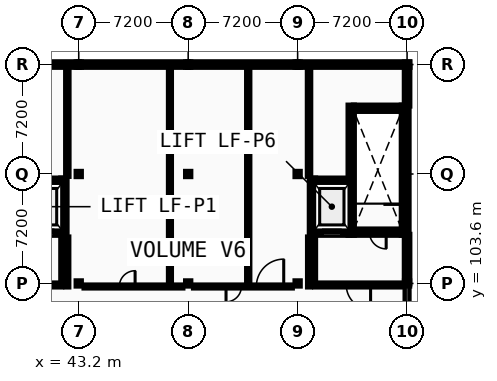
"""IFC4 building model, lengths in metres.
Left out: names, types, materials, properties, quantities, classifications, styles, units other than length and angle.
Written with IfcOpenShell. Run it as: python <this file> out.ifc"""

import sys

from ifc_helpers import new_model, si_unit, direction, frame, frame_2d, origin, origin_2d, place, context, subcontext, project, spatial, rectangle, i_section, extrude, element, fill, save


model = new_model("IFC4")
c1 = context("Model", 3, precision=1e-05, world=origin(), true_north=direction((0.0, 1.0)))
c2 = subcontext(c1, "Body", "Model", "MODEL_VIEW")
j1 = project(units=[si_unit("LENGTHUNIT", "METRE"), si_unit("PLANEANGLEUNIT", "RADIAN")], contexts=[c1])
p1 = place(None, origin())
s1 = spatial("IfcSite", under=j1, at=p1, CompositionType="ELEMENT")
p2 = place(p1, origin())
s2 = spatial("IfcBuilding", under=s1, at=p2, CompositionType="ELEMENT")
p3 = place(p2, frame((0.0, 0.0, 22.8)))
s3 = spatial("IfcBuildingStorey", under=s2, at=p3, CompositionType="ELEMENT", Elevation=22.8)
for number, where, z_axis, x_axis in (
    (1, (43.2, 103.6, 0.0), (0.0, 0.0, 1.0), (1.0, 0.0, 0.0)),
    (2, (43.2, 110.8, 0.0), (0.0, 0.0, 1.0), (1.0, 0.0, 0.0)),
    (3, (43.2, 118.0, 0.0), (0.0, 0.0, 1.0), (1.0, 0.0, 0.0)),
    (4, (50.4, 103.6, 0.0), (0.0, 0.0, 1.0), (1.0, 0.0, 0.0)),
    (5, (50.4, 110.8, 0.0), (0.0, 0.0, 1.0), (1.0, 0.0, 0.0)),
    (6, (50.4, 118.0, 0.0), (0.0, 0.0, 1.0), (1.0, 0.0, 0.0)),
    (7, (57.6, 103.6, 0.0), (0.0, 0.0, 1.0), (1.0, 0.0, 0.0)),
    (8, (57.6, 110.8, 0.0), (0.0, 0.0, 1.0), (1.0, 0.0, 0.0)),
    (9, (57.6, 118.0, 0.0), (0.0, 0.0, 1.0), (1.0, 0.0, 0.0)),
    (10, (64.8, 103.6, 0.0), (0.0, 0.0, 1.0), (1.0, 0.0, 0.0)),
    (11, (64.8, 118.0, 0.0), (0.0, 0.0, 1.0), (1.0, 0.0, 0.0)),
):
    element("IfcColumn", number, at=place(p3, frame(where, z_axis=z_axis, x_axis=x_axis)), inside=s3, PredefinedType="COLUMN", context=c2, shape_type="SweptSolid", body=[
        extrude(i_section(OverallWidth=0.28, OverallDepth=0.28, WebThickness=0.01, FlangeThickness=0.018, FilletRadius=0.024, at=origin_2d()), origin(), (0.0, 0.0, 1.0), 4.4),
    ])
p4 = place(p3, frame((43.2, 118.0, 0.0), z_axis=(0.0, 0.0, 1.0), x_axis=(-1.0, 0.0, 0.0)))
e12 = element("IfcWall", 12, at=p4, inside=s3, PredefinedType="STANDARD", context=c2, shape_type="SweptSolid", body=[
    extrude(rectangle(XDim=7.35, YDim=0.3, at=frame_2d((3.675, 0.0))), origin(), (0.0, 0.0, 1.0), 4.035),
])
p5 = place(p4, frame((1.707, 0.0, 0.95)))
e13 = element("IfcOpeningElement", 13, at=p5, cuts=e12, PredefinedType="OPENING", context=c2, shape_type="SweptSolid", body=[
    extrude(rectangle(XDim=0.996, YDim=1.296, at=frame_2d((0.498, 0.648))), frame((0.0, 0.16, 0.0), z_axis=(0.0, -1.0, 0.0), x_axis=(1.0, 0.0, 0.0)), (0.0, 0.0, 1.0), 0.32),
])
p6 = place(p4, frame((4.647, 0.0, 0.95)))
e14 = element("IfcOpeningElement", 14, at=p6, cuts=e12, PredefinedType="OPENING", context=c2, shape_type="SweptSolid", body=[
    extrude(rectangle(XDim=0.996, YDim=1.296, at=frame_2d((0.498, 0.648))), frame((0.0, 0.16, 0.0), z_axis=(0.0, -1.0, 0.0), x_axis=(1.0, 0.0, 0.0)), (0.0, 0.0, 1.0), 0.32),
])
p7 = place(p3, frame((50.4, 118.0, 0.0), z_axis=(0.0, 0.0, 1.0), x_axis=(-1.0, 0.0, 0.0)))
e15 = element("IfcWall", 15, at=p7, inside=s3, PredefinedType="STANDARD", context=c2, shape_type="SweptSolid", body=[
    extrude(rectangle(XDim=7.2, YDim=0.3, at=frame_2d((3.6, 0.0))), origin(), (0.0, 0.0, 1.0), 4.035),
])
p8 = place(p7, frame((1.645, 0.0, 0.95)))
e16 = element("IfcOpeningElement", 16, at=p8, cuts=e15, PredefinedType="OPENING", context=c2, shape_type="SweptSolid", body=[
    extrude(rectangle(XDim=1.03, YDim=1.296, at=frame_2d((0.515, 0.648))), frame((0.0, 0.16, 0.0), z_axis=(0.0, -1.0, 0.0), x_axis=(1.0, 0.0, 0.0)), (0.0, 0.0, 1.0), 0.32),
])
p9 = place(p3, frame((57.6, 118.0, 0.0), z_axis=(0.0, 0.0, 1.0), x_axis=(-1.0, 0.0, 0.0)))
e17 = element("IfcWall", 17, at=p9, inside=s3, PredefinedType="STANDARD", context=c2, shape_type="SweptSolid", body=[
    extrude(rectangle(XDim=7.2, YDim=0.3, at=frame_2d((3.6, 0.0))), origin(), (0.0, 0.0, 1.0), 4.035),
])
p10 = place(p9, frame((1.628, 0.0, 0.95)))
e18 = element("IfcOpeningElement", 18, at=p10, cuts=e17, PredefinedType="OPENING", context=c2, shape_type="SweptSolid", body=[
    extrude(rectangle(XDim=1.064, YDim=1.296, at=frame_2d((0.532, 0.648))), frame((0.0, 0.16, 0.0), z_axis=(0.0, -1.0, 0.0), x_axis=(1.0, 0.0, 0.0)), (0.0, 0.0, 1.0), 0.32),
])
p11 = place(p9, frame((4.508, 0.0, 0.95)))
e19 = element("IfcOpeningElement", 19, at=p11, cuts=e17, PredefinedType="OPENING", context=c2, shape_type="SweptSolid", body=[
    extrude(rectangle(XDim=1.064, YDim=1.296, at=frame_2d((0.532, 0.648))), frame((0.0, 0.16, 0.0), z_axis=(0.0, -1.0, 0.0), x_axis=(1.0, 0.0, 0.0)), (0.0, 0.0, 1.0), 0.32),
])
p12 = place(p3, frame((64.95, 118.0, 0.0), z_axis=(0.0, 0.0, 1.0), x_axis=(-1.0, 0.0, 0.0)))
e20 = element("IfcWall", 20, at=p12, inside=s3, PredefinedType="STANDARD", context=c2, shape_type="SweptSolid", body=[
    extrude(rectangle(XDim=7.35, YDim=0.3, at=frame_2d((3.675, 0.0))), origin(), (0.0, 0.0, 1.0), 4.035),
])
p13 = place(p12, frame((1.656, 0.0, 0.95)))
e21 = element("IfcOpeningElement", 21, at=p13, cuts=e20, PredefinedType="OPENING", context=c2, shape_type="SweptSolid", body=[
    extrude(rectangle(XDim=1.098, YDim=1.296, at=frame_2d((0.549, 0.648))), frame((0.0, 0.16, 0.0), z_axis=(0.0, -1.0, 0.0), x_axis=(1.0, 0.0, 0.0)), (0.0, 0.0, 1.0), 0.32),
])
p14 = place(p12, frame((4.596, 0.0, 0.95)))
e22 = element("IfcOpeningElement", 22, at=p14, cuts=e20, PredefinedType="OPENING", context=c2, shape_type="SweptSolid", body=[
    extrude(rectangle(XDim=1.098, YDim=1.296, at=frame_2d((0.549, 0.648))), frame((0.0, 0.16, 0.0), z_axis=(0.0, -1.0, 0.0), x_axis=(1.0, 0.0, 0.0)), (0.0, 0.0, 1.0), 0.32),
])
p15 = place(p3, frame((64.8, 103.6, 0.0), z_axis=(0.0, 0.0, 1.0), x_axis=(0.0, 1.0, 0.0)))
e23 = element("IfcWall", 23, at=p15, inside=s3, PredefinedType="STANDARD", context=c2, shape_type="SweptSolid", body=[
    extrude(rectangle(XDim=3.2, YDim=0.3, at=frame_2d((1.6, 0.0))), origin(), (0.0, 0.0, 1.0), 4.11),
])
p16 = place(p15, frame((1.0, 0.0, 0.95)))
e24 = element("IfcOpeningElement", 24, at=p16, cuts=e23, PredefinedType="OPENING", context=c2, shape_type="SweptSolid", body=[
    extrude(rectangle(XDim=1.2, YDim=1.296, at=frame_2d((0.6, 0.648))), frame((0.0, 0.16, 0.0), z_axis=(0.0, -1.0, 0.0), x_axis=(1.0, 0.0, 0.0)), (0.0, 0.0, 1.0), 0.32),
])
p17 = place(p3, frame((64.8, 115.3, 0.0), z_axis=(0.0, 0.0, 1.0), x_axis=(0.0, 1.0, 0.0)))
e25 = element("IfcWall", 25, at=p17, inside=s3, PredefinedType="STANDARD", context=c2, shape_type="SweptSolid", body=[
    extrude(rectangle(XDim=2.55, YDim=0.3, at=frame_2d((1.275, 0.0))), origin(), (0.0, 0.0, 1.0), 4.11),
])
p18 = place(p3, frame((64.8, 96.6, 4.4), z_axis=(0.0, 0.0, 1.0), x_axis=(0.0, 1.0, 0.0)))
e26 = element("IfcWall", 26, at=p18, inside=s3, PredefinedType="PARAPET", context=c2, shape_type="SweptSolid", body=[
    extrude(rectangle(XDim=21.2, YDim=0.2, at=frame_2d((10.6, 0.0))), origin(), (0.0, 0.0, 1.0), 0.55),
])
p19 = place(p3, frame((39.85, 106.975, 0.0), z_axis=(0.0, 0.0, 1.0), x_axis=(1.0, 0.0, 0.0)))
e27 = element("IfcWall", 27, at=p19, inside=s3, PredefinedType="SHEAR", context=c2, shape_type="SweptSolid", body=[
    extrude(rectangle(XDim=2.2, YDim=0.35, at=frame_2d((1.1, 0.0))), origin(), (0.0, 0.0, 1.0), 4.18),
])
p20 = place(p19, frame((0.5, 0.0, 0.0)))
e28 = element("IfcOpeningElement", 28, at=p20, cuts=e27, PredefinedType="OPENING", context=c2, shape_type="SweptSolid", body=[
    extrude(rectangle(XDim=1.2, YDim=2.2, at=frame_2d((0.6, 1.1))), frame((0.0, 0.185, 0.0), z_axis=(0.0, -1.0, 0.0), x_axis=(1.0, 0.0, 0.0)), (0.0, 0.0, 1.0), 0.37),
])
p21 = place(p3, frame((39.85, 110.325, 0.0), z_axis=(0.0, 0.0, 1.0), x_axis=(1.0, 0.0, 0.0)))
e29 = element("IfcWall", 29, at=p21, inside=s3, PredefinedType="SHEAR", context=c2, shape_type="SweptSolid", body=[
    extrude(rectangle(XDim=2.2, YDim=0.35, at=frame_2d((1.1, 0.0))), origin(), (0.0, 0.0, 1.0), 4.18),
])
p22 = place(p3, frame((42.225, 106.8, 0.0), z_axis=(0.0, 0.0, 1.0), x_axis=(0.0, 1.0, 0.0)))
e30 = element("IfcWall", 30, at=p22, inside=s3, PredefinedType="SHEAR", context=c2, shape_type="SweptSolid", body=[
    extrude(rectangle(XDim=3.7, YDim=0.35, at=frame_2d((1.85, 0.0))), origin(), (0.0, 0.0, 1.0), 4.18),
])
p23 = place(p3, frame((36.35, 103.5, 0.0), z_axis=(0.0, 0.0, 1.0), x_axis=(1.0, 0.0, 0.0)))
e31 = element("IfcWall", 31, at=p23, inside=s3, PredefinedType="PARTITIONING", context=c2, shape_type="SweptSolid", body=[
    extrude(rectangle(XDim=5.7, YDim=0.2, at=frame_2d((2.85, 0.0))), origin(), (0.0, 0.0, 1.0), 4.035),
])
p24 = place(p23, frame((2.05, 0.0, 0.0)))
e32 = element("IfcOpeningElement", 32, at=p24, cuts=e31, PredefinedType="OPENING", context=c2, shape_type="SweptSolid", body=[
    extrude(rectangle(XDim=1.6, YDim=2.2, at=frame_2d((0.8, 1.1))), frame((0.0, 0.11, 0.0), z_axis=(0.0, -1.0, 0.0), x_axis=(1.0, 0.0, 0.0)), (0.0, 0.0, 1.0), 0.22),
])
p25 = place(p3, frame((42.15, 103.6, 0.0), z_axis=(0.0, 0.0, 1.0), x_axis=(0.0, 1.0, 0.0)))
e33 = element("IfcWall", 33, at=p25, inside=s3, PredefinedType="PARTITIONING", context=c2, shape_type="SweptSolid", body=[
    extrude(rectangle(XDim=3.2, YDim=0.2, at=frame_2d((1.6, 0.0))), origin(), (0.0, 0.0, 1.0), 4.18),
])
p26 = place(p3, frame((61.3, 106.975, 0.0), z_axis=(0.0, 0.0, 1.0), x_axis=(1.0, 0.0, 0.0)))
e34 = element("IfcWall", 34, at=p26, inside=s3, PredefinedType="SHEAR", context=c2, shape_type="SweptSolid", body=[
    extrude(rectangle(XDim=3.15, YDim=0.35, at=frame_2d((1.575, 0.0))), origin(), (0.0, 0.0, 1.0), 4.18),
])
p27 = place(p26, frame((1.025, 0.0, 0.0)))
e35 = element("IfcOpeningElement", 35, at=p27, cuts=e34, PredefinedType="OPENING", context=c2, shape_type="SweptSolid", body=[
    extrude(rectangle(XDim=1.1, YDim=2.15, at=frame_2d((0.55, 1.075))), frame((0.0, 0.185, 0.0), z_axis=(0.0, -1.0, 0.0), x_axis=(1.0, 0.0, 0.0)), (0.0, 0.0, 1.0), 0.37),
])
p28 = place(p3, frame((61.3, 115.125, 0.0), z_axis=(0.0, 0.0, 1.0), x_axis=(1.0, 0.0, 0.0)))
e36 = element("IfcWall", 36, at=p28, inside=s3, PredefinedType="SHEAR", context=c2, shape_type="SweptSolid", body=[
    extrude(rectangle(XDim=3.15, YDim=0.35, at=frame_2d((1.575, 0.0))), origin(), (0.0, 0.0, 1.0), 4.18),
])
for number, where, z_axis, x_axis in (
    (37, (61.125, 106.8, 0.0), (0.0, 0.0, 1.0), (0.0, 1.0, 0.0)),
    (38, (64.625, 106.8, 0.0), (0.0, 0.0, 1.0), (0.0, 1.0, 0.0)),
):
    element("IfcWall", number, at=place(p3, frame(where, z_axis=z_axis, x_axis=x_axis)), inside=s3, PredefinedType="SHEAR", context=c2, shape_type="SweptSolid", body=[
        extrude(rectangle(XDim=8.5, YDim=0.35, at=frame_2d((4.25, 0.0))), origin(), (0.0, 0.0, 1.0), 4.18),
    ])
p29 = place(p3, frame((58.75, 106.975, 0.0), z_axis=(0.0, 0.0, 1.0), x_axis=(1.0, 0.0, 0.0)))
e39 = element("IfcWall", 39, at=p29, inside=s3, PredefinedType="SHEAR", context=c2, shape_type="SweptSolid", body=[
    extrude(rectangle(XDim=2.2, YDim=0.35, at=frame_2d((1.1, 0.0))), origin(), (0.0, 0.0, 1.0), 4.18),
])
p30 = place(p29, frame((0.5, 0.0, 0.0)))
e40 = element("IfcOpeningElement", 40, at=p30, cuts=e39, PredefinedType="OPENING", context=c2, shape_type="SweptSolid", body=[
    extrude(rectangle(XDim=1.2, YDim=2.2, at=frame_2d((0.6, 1.1))), frame((0.0, 0.185, 0.0), z_axis=(0.0, -1.0, 0.0), x_axis=(1.0, 0.0, 0.0)), (0.0, 0.0, 1.0), 0.37),
])
p31 = place(p3, frame((58.75, 110.325, 0.0), z_axis=(0.0, 0.0, 1.0), x_axis=(1.0, 0.0, 0.0)))
e41 = element("IfcWall", 41, at=p31, inside=s3, PredefinedType="SHEAR", context=c2, shape_type="SweptSolid", body=[
    extrude(rectangle(XDim=2.2, YDim=0.35, at=frame_2d((1.1, 0.0))), origin(), (0.0, 0.0, 1.0), 4.18),
])
p32 = place(p3, frame((58.575, 106.8, 0.0), z_axis=(0.0, 0.0, 1.0), x_axis=(0.0, 1.0, 0.0)))
e42 = element("IfcWall", 42, at=p32, inside=s3, PredefinedType="SHEAR", context=c2, shape_type="SweptSolid", body=[
    extrude(rectangle(XDim=3.7, YDim=0.35, at=frame_2d((1.85, 0.0))), origin(), (0.0, 0.0, 1.0), 4.18),
])
p33 = place(p3, frame((58.75, 103.5, 0.0), z_axis=(0.0, 0.0, 1.0), x_axis=(1.0, 0.0, 0.0)))
e43 = element("IfcWall", 43, at=p33, inside=s3, PredefinedType="PARTITIONING", context=c2, shape_type="SweptSolid", body=[
    extrude(rectangle(XDim=5.7, YDim=0.2, at=frame_2d((2.85, 0.0))), origin(), (0.0, 0.0, 1.0), 4.035),
])
p34 = place(p33, frame((2.05, 0.0, 0.0)))
e44 = element("IfcOpeningElement", 44, at=p34, cuts=e43, PredefinedType="OPENING", context=c2, shape_type="SweptSolid", body=[
    extrude(rectangle(XDim=1.6, YDim=2.2, at=frame_2d((0.8, 1.1))), frame((0.0, 0.11, 0.0), z_axis=(0.0, -1.0, 0.0), x_axis=(1.0, 0.0, 0.0)), (0.0, 0.0, 1.0), 0.22),
])
p35 = place(p3, frame((58.65, 103.6, 0.0), z_axis=(0.0, 0.0, 1.0), x_axis=(0.0, 1.0, 0.0)))
e45 = element("IfcWall", 45, at=p35, inside=s3, PredefinedType="PARTITIONING", context=c2, shape_type="SweptSolid", body=[
    extrude(rectangle(XDim=3.2, YDim=0.2, at=frame_2d((1.6, 0.0))), origin(), (0.0, 0.0, 1.0), 4.18),
])
p36 = place(p3, frame((43.58, 103.4, 0.0), z_axis=(0.0, 0.0, 1.0), x_axis=(1.0, 0.0, 0.0)))
e46 = element("IfcWall", 46, at=p36, inside=s3, PredefinedType="PARTITIONING", context=c2, shape_type="SweptSolid", body=[
    extrude(rectangle(XDim=6.44, YDim=0.135, at=frame_2d((3.22, 0.0))), origin(), (0.0, 0.0, 1.0), 4.035),
])
p37 = place(p36, frame((2.292, 0.0, 0.0)))
e47 = element("IfcOpeningElement", 47, at=p37, cuts=e46, PredefinedType="OPENING", context=c2, shape_type="SweptSolid", body=[
    extrude(rectangle(XDim=1.036, YDim=2.096, at=frame_2d((0.518, 1.048))), frame((0.0, 0.078, 0.0), z_axis=(0.0, -1.0, 0.0), x_axis=(1.0, 0.0, 0.0)), (0.0, 0.0, 1.0), 0.155),
])
p38 = place(p3, frame((50.78, 103.4, 0.0), z_axis=(0.0, 0.0, 1.0), x_axis=(1.0, 0.0, 0.0)))
e48 = element("IfcWall", 48, at=p38, inside=s3, PredefinedType="PARTITIONING", context=c2, shape_type="SweptSolid", body=[
    extrude(rectangle(XDim=6.44, YDim=0.135, at=frame_2d((3.22, 0.0))), origin(), (0.0, 0.0, 1.0), 4.035),
])
p39 = place(p38, frame((4.105, 0.0, 0.0)))
e49 = element("IfcOpeningElement", 49, at=p39, cuts=e48, PredefinedType="OPENING", context=c2, shape_type="SweptSolid", body=[
    extrude(rectangle(XDim=1.8, YDim=2.3, at=frame_2d((0.9, 1.15))), frame((0.0, 0.078, 0.0), z_axis=(0.0, -1.0, 0.0), x_axis=(1.0, 0.0, 0.0)), (0.0, 0.0, 1.0), 0.155),
])
p40 = place(p38, frame((2.11, 0.0, 0.0)))
e50 = element("IfcOpeningElement", 50, at=p40, cuts=e48, PredefinedType="OPENING", context=c2, shape_type="SweptSolid", body=[
    extrude(rectangle(XDim=1.01, YDim=2.096, at=frame_2d((0.505, 1.048))), frame((0.0, 0.078, 0.0), z_axis=(0.0, -1.0, 0.0), x_axis=(1.0, 0.0, 0.0)), (0.0, 0.0, 1.0), 0.155),
])
p41 = place(p3, frame((42.45, 103.4, 0.0), z_axis=(0.0, 0.0, 1.0), x_axis=(0.0, 1.0, 0.0)))
e51 = element("IfcWall", 51, at=p41, inside=s3, PredefinedType="PARTITIONING", context=c2, shape_type="SweptSolid", body=[
    extrude(rectangle(XDim=3.225, YDim=0.135, at=frame_2d((1.613, 0.0))), origin(), (0.0, 0.0, 1.0), 4.18),
])
p42 = place(p3, frame((42.45, 110.675, 0.0), z_axis=(0.0, 0.0, 1.0), x_axis=(0.0, 1.0, 0.0)))
e52 = element("IfcWall", 52, at=p42, inside=s3, PredefinedType="PARTITIONING", context=c2, shape_type="SweptSolid", body=[
    extrude(rectangle(XDim=7.125, YDim=0.16, at=frame_2d((3.562, 0.0))), origin(), (0.0, 0.0, 1.0), 4.18),
])
p43 = place(p3, frame((49.2, 103.468, 0.0), z_axis=(0.0, 0.0, 1.0), x_axis=(0.0, 1.0, 0.0)))
e53 = element("IfcWall", 53, at=p43, inside=s3, PredefinedType="PARTITIONING", context=c2, shape_type="SweptSolid", body=[
    extrude(rectangle(XDim=14.333, YDim=0.135, at=frame_2d((7.166, 0.0))), origin(), (0.0, 0.0, 1.0), 4.18),
])
p44 = place(p3, frame((54.35, 103.468, 0.0), z_axis=(0.0, 0.0, 1.0), x_axis=(0.0, 1.0, 0.0)))
e54 = element("IfcWall", 54, at=p44, inside=s3, PredefinedType="PARTITIONING", context=c2, shape_type="SweptSolid", body=[
    extrude(rectangle(XDim=14.333, YDim=0.15, at=frame_2d((7.166, 0.0))), origin(), (0.0, 0.0, 1.0), 4.18),
])
p45 = place(p3, frame((58.35, 103.4, 0.0), z_axis=(0.0, 0.0, 1.0), x_axis=(0.0, 1.0, 0.0)))
e55 = element("IfcWall", 55, at=p45, inside=s3, PredefinedType="PARTITIONING", context=c2, shape_type="SweptSolid", body=[
    extrude(rectangle(XDim=3.225, YDim=0.135, at=frame_2d((1.613, 0.0))), origin(), (0.0, 0.0, 1.0), 4.18),
])
p46 = place(p3, frame((58.35, 110.675, 0.0), z_axis=(0.0, 0.0, 1.0), x_axis=(0.0, 1.0, 0.0)))
e56 = element("IfcWall", 56, at=p46, inside=s3, PredefinedType="PARTITIONING", context=c2, shape_type="SweptSolid", body=[
    extrude(rectangle(XDim=7.125, YDim=0.16, at=frame_2d((3.562, 0.0))), origin(), (0.0, 0.0, 1.0), 4.18),
])
p47 = place(p5, origin())
e57 = element("IfcWindow", 57, at=p47, inside=s3, PartitioningType="SINGLE_PANEL", PredefinedType="WINDOW", context=c2, shape_type="SweptSolid", body=[
    extrude(rectangle(XDim=0.996, YDim=1.296, at=frame_2d((0.498, 0.648))), frame((0.0, 0.03, 0.0), z_axis=(0.0, -1.0, 0.0), x_axis=(1.0, 0.0, 0.0)), (0.0, 0.0, 1.0), 0.06),
])
fill(e13, e57)
p48 = place(p8, origin())
e58 = element("IfcWindow", 58, at=p48, inside=s3, PartitioningType="SINGLE_PANEL", PredefinedType="WINDOW", context=c2, shape_type="SweptSolid", body=[
    extrude(rectangle(XDim=1.03, YDim=1.296, at=frame_2d((0.515, 0.648))), frame((0.0, 0.03, 0.0), z_axis=(0.0, -1.0, 0.0), x_axis=(1.0, 0.0, 0.0)), (0.0, 0.0, 1.0), 0.06),
])
fill(e16, e58)
p49 = place(p10, origin())
e59 = element("IfcWindow", 59, at=p49, inside=s3, PartitioningType="SINGLE_PANEL", PredefinedType="WINDOW", context=c2, shape_type="SweptSolid", body=[
    extrude(rectangle(XDim=1.064, YDim=1.296, at=frame_2d((0.532, 0.648))), frame((0.0, 0.03, 0.0), z_axis=(0.0, -1.0, 0.0), x_axis=(1.0, 0.0, 0.0)), (0.0, 0.0, 1.0), 0.06),
])
fill(e18, e59)
p50 = place(p11, origin())
e60 = element("IfcWindow", 60, at=p50, inside=s3, PartitioningType="SINGLE_PANEL", PredefinedType="WINDOW", context=c2, shape_type="SweptSolid", body=[
    extrude(rectangle(XDim=1.064, YDim=1.296, at=frame_2d((0.532, 0.648))), frame((0.0, 0.03, 0.0), z_axis=(0.0, -1.0, 0.0), x_axis=(1.0, 0.0, 0.0)), (0.0, 0.0, 1.0), 0.06),
])
fill(e19, e60)
p51 = place(p13, origin())
e61 = element("IfcWindow", 61, at=p51, inside=s3, PartitioningType="SINGLE_PANEL", PredefinedType="WINDOW", context=c2, shape_type="SweptSolid", body=[
    extrude(rectangle(XDim=1.098, YDim=1.296, at=frame_2d((0.549, 0.648))), frame((0.0, 0.03, 0.0), z_axis=(0.0, -1.0, 0.0), x_axis=(1.0, 0.0, 0.0)), (0.0, 0.0, 1.0), 0.06),
])
fill(e21, e61)
p52 = place(p14, origin())
e62 = element("IfcWindow", 62, at=p52, inside=s3, PartitioningType="SINGLE_PANEL", PredefinedType="WINDOW", context=c2, shape_type="SweptSolid", body=[
    extrude(rectangle(XDim=1.098, YDim=1.296, at=frame_2d((0.549, 0.648))), frame((0.0, 0.03, 0.0), z_axis=(0.0, -1.0, 0.0), x_axis=(1.0, 0.0, 0.0)), (0.0, 0.0, 1.0), 0.06),
])
fill(e22, e62)
p53 = place(p16, origin())
e63 = element("IfcWindow", 63, at=p53, inside=s3, PartitioningType="SINGLE_PANEL", PredefinedType="WINDOW", context=c2, shape_type="SweptSolid", body=[
    extrude(rectangle(XDim=1.2, YDim=1.296, at=frame_2d((0.6, 0.648))), frame((0.0, 0.03, 0.0), z_axis=(0.0, -1.0, 0.0), x_axis=(1.0, 0.0, 0.0)), (0.0, 0.0, 1.0), 0.06),
])
fill(e24, e63)
p54 = place(p20, origin())
e64 = element("IfcDoor", 64, at=p54, inside=s3, OperationType="SLIDING_TO_RIGHT", PredefinedType="DOOR", context=c2, shape_type="SweptSolid", body=[
    extrude(rectangle(XDim=1.2, YDim=2.2, at=frame_2d((0.6, 1.1))), frame((0.0, 0.025, 0.0), z_axis=(0.0, -1.0, 0.0), x_axis=(1.0, 0.0, 0.0)), (0.0, 0.0, 1.0), 0.05),
])
fill(e28, e64)
p55 = place(p27, origin())
e65 = element("IfcDoor", 65, at=p55, inside=s3, OperationType="SINGLE_SWING_RIGHT", PredefinedType="DOOR", context=c2, shape_type="SweptSolid", body=[
    extrude(rectangle(XDim=1.1, YDim=2.15, at=frame_2d((0.55, 1.075))), frame((0.0, 0.025, 0.0), z_axis=(0.0, -1.0, 0.0), x_axis=(1.0, 0.0, 0.0)), (0.0, 0.0, 1.0), 0.05),
])
fill(e35, e65)
p56 = place(p30, origin())
e66 = element("IfcDoor", 66, at=p56, inside=s3, OperationType="SLIDING_TO_RIGHT", PredefinedType="DOOR", context=c2, shape_type="SweptSolid", body=[
    extrude(rectangle(XDim=1.2, YDim=2.2, at=frame_2d((0.6, 1.1))), frame((0.0, 0.025, 0.0), z_axis=(0.0, -1.0, 0.0), x_axis=(1.0, 0.0, 0.0)), (0.0, 0.0, 1.0), 0.05),
])
fill(e40, e66)
p57 = place(p34, origin())
e67 = element("IfcDoor", 67, at=p57, inside=s3, OperationType="DOUBLE_DOOR_SINGLE_SWING", PredefinedType="DOOR", context=c2, shape_type="SweptSolid", body=[
    extrude(rectangle(XDim=1.6, YDim=2.2, at=frame_2d((0.8, 1.1))), frame((0.0, 0.025, 0.0), z_axis=(0.0, -1.0, 0.0), x_axis=(1.0, 0.0, 0.0)), (0.0, 0.0, 1.0), 0.05),
])
fill(e44, e67)
p58 = place(p39, frame((1.8, 0.0, 0.0), z_axis=(0.0, 0.0, 1.0), x_axis=(-1.0, 0.0, 0.0)))
e68 = element("IfcDoor", 68, at=p58, inside=s3, OperationType="DOUBLE_DOOR_SINGLE_SWING", PredefinedType="DOOR", context=c2, shape_type="SweptSolid", body=[
    extrude(rectangle(XDim=1.8, YDim=2.3, at=frame_2d((0.9, 1.15))), frame((0.0, 0.025, 0.0), z_axis=(0.0, -1.0, 0.0), x_axis=(1.0, 0.0, 0.0)), (0.0, 0.0, 1.0), 0.05),
])
fill(e49, e68)
p59 = place(p40, frame((1.01, 0.0, 0.0), z_axis=(0.0, 0.0, 1.0), x_axis=(-1.0, 0.0, 0.0)))
e69 = element("IfcDoor", 69, at=p59, inside=s3, OperationType="SINGLE_SWING_LEFT", PredefinedType="DOOR", context=c2, shape_type="SweptSolid", body=[
    extrude(rectangle(XDim=1.01, YDim=2.096, at=frame_2d((0.505, 1.048))), frame((0.0, 0.025, 0.0), z_axis=(0.0, -1.0, 0.0), x_axis=(1.0, 0.0, 0.0)), (0.0, 0.0, 1.0), 0.05),
])
fill(e50, e69)
p60 = place(p37, frame((1.036, 0.0, 0.0), z_axis=(0.0, 0.0, 1.0), x_axis=(-1.0, 0.0, 0.0)))
e70 = element("IfcDoor", 70, at=p60, inside=s3, OperationType="SINGLE_SWING_RIGHT", PredefinedType="DOOR", context=c2, shape_type="SweptSolid", body=[
    extrude(rectangle(XDim=1.036, YDim=2.096, at=frame_2d((0.518, 1.048))), frame((0.0, 0.025, 0.0), z_axis=(0.0, -1.0, 0.0), x_axis=(1.0, 0.0, 0.0)), (0.0, 0.0, 1.0), 0.05),
])
fill(e47, e70)
save(model, sys.argv[1])
